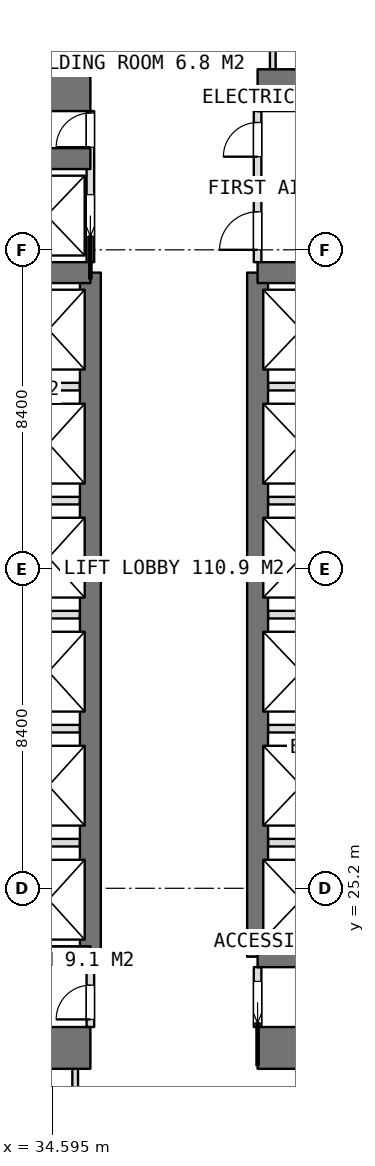
"""IFC4 building model, lengths in metres.
Left out: names, types, materials, properties, quantities, classifications, styles, units other than length and angle.
Written with IfcOpenShell. Run it as: python <this file> out.ifc"""

import sys

from ifc_helpers import new_model, si_unit, direction, frame, frame_2d, origin, place, context, subcontext, project, spatial, rectangle, extrude, element, fill, save


model = new_model("IFC4")
c1 = context("Model", 3, precision=1e-05, world=origin(), true_north=direction((0.0, 1.0)))
c2 = subcontext(c1, "Body", "Model", "MODEL_VIEW")
j1 = project(units=[si_unit("LENGTHUNIT", "METRE"), si_unit("PLANEANGLEUNIT", "RADIAN")], contexts=[c1])
p1 = place(None, origin())
s1 = spatial("IfcSite", under=j1, at=p1, CompositionType="ELEMENT")
p2 = place(p1, origin())
s2 = spatial("IfcBuilding", under=s1, at=p2, CompositionType="ELEMENT")
p3 = place(p2, frame((0.0, 0.0, 20.4)))
s3 = spatial("IfcBuildingStorey", under=s2, at=p3, CompositionType="ELEMENT", Elevation=20.4)
p4 = place(p3, frame((25.2, 21.0, 0.0), z_axis=(0.0, 0.0, 1.0), x_axis=(1.0, 0.0, 0.0)))
e1 = element("IfcWall", 1, at=p4, inside=s3, PredefinedType="SHEAR", context=c2, shape_type="SweptSolid", body=[
    extrude(rectangle(XDim=10.4, YDim=1.1, at=frame_2d((5.2, 0.0))), origin(), (0.0, 0.0, 1.0), 5.0),
])
p5 = place(p3, frame((40.0, 21.0, 0.0), z_axis=(0.0, 0.0, 1.0), x_axis=(1.0, 0.0, 0.0)))
e2 = element("IfcWall", 2, at=p5, inside=s3, PredefinedType="SHEAR", context=c2, shape_type="SweptSolid", body=[
    extrude(rectangle(XDim=10.4, YDim=1.1, at=frame_2d((5.2, 0.0))), origin(), (0.0, 0.0, 1.0), 5.0),
])
p6 = place(p3, frame((25.2, 46.2, 0.0), z_axis=(0.0, 0.0, 1.0), x_axis=(1.0, 0.0, 0.0)))
e3 = element("IfcWall", 3, at=p6, inside=s3, PredefinedType="SHEAR", context=c2, shape_type="SweptSolid", body=[
    extrude(rectangle(XDim=10.4, YDim=1.1, at=frame_2d((5.2, 0.0))), origin(), (0.0, 0.0, 1.0), 5.0),
])
p7 = place(p3, frame((40.0, 46.2, 0.0), z_axis=(0.0, 0.0, 1.0), x_axis=(1.0, 0.0, 0.0)))
e4 = element("IfcWall", 4, at=p7, inside=s3, PredefinedType="SHEAR", context=c2, shape_type="SweptSolid", body=[
    extrude(rectangle(XDim=10.4, YDim=1.1, at=frame_2d((5.2, 0.0))), origin(), (0.0, 0.0, 1.0), 5.0),
])
for number, where, z_axis, x_axis in (
    (5, (35.6, 23.4, 0.0), (0.0, 0.0, 1.0), (0.0, 1.0, 0.0)),
    (6, (40.0, 23.4, 0.0), (0.0, 0.0, 1.0), (0.0, 1.0, 0.0)),
):
    element("IfcWall", number, at=place(p3, frame(where, z_axis=z_axis, x_axis=x_axis)), inside=s3, PredefinedType="SHEAR", context=c2, shape_type="SweptSolid", body=[
        extrude(rectangle(XDim=18.0, YDim=0.55, at=frame_2d((9.0, 0.0))), origin(), (0.0, 0.0, 1.0), 5.0),
    ])
for number, where, z_axis, x_axis in (
    (7, (31.8, 23.4, 0.0), (0.0, 0.0, 1.0), (1.0, 0.0, 0.0)),
    (8, (31.8, 41.4, 0.0), (0.0, 0.0, 1.0), (1.0, 0.0, 0.0)),
    (9, (31.8, 44.4, 0.0), (0.0, 0.0, 1.0), (1.0, 0.0, 0.0)),
    (10, (40.0, 23.4, 0.0), (0.0, 0.0, 1.0), (1.0, 0.0, 0.0)),
    (11, (40.0, 41.4, 0.0), (0.0, 0.0, 1.0), (1.0, 0.0, 0.0)),
):
    element("IfcWall", number, at=place(p3, frame(where, z_axis=z_axis, x_axis=x_axis)), inside=s3, PredefinedType="SHEAR", context=c2, shape_type="SweptSolid", body=[
        extrude(rectangle(XDim=3.8, YDim=0.55, at=frame_2d((1.9, 0.0))), origin(), (0.0, 0.0, 1.0), 5.0),
    ])
for number, where, z_axis, x_axis in (
    (12, (32.075, 26.4, 0.0), (0.0, 0.0, 1.0), (1.0, 0.0, 0.0)),
    (13, (32.075, 29.4, 0.0), (0.0, 0.0, 1.0), (1.0, 0.0, 0.0)),
    (14, (32.075, 32.4, 0.0), (0.0, 0.0, 1.0), (1.0, 0.0, 0.0)),
    (15, (32.075, 35.4, 0.0), (0.0, 0.0, 1.0), (1.0, 0.0, 0.0)),
    (16, (32.075, 38.4, 0.0), (0.0, 0.0, 1.0), (1.0, 0.0, 0.0)),
    (17, (40.275, 26.4, 0.0), (0.0, 0.0, 1.0), (1.0, 0.0, 0.0)),
    (18, (40.275, 29.4, 0.0), (0.0, 0.0, 1.0), (1.0, 0.0, 0.0)),
    (19, (40.275, 32.4, 0.0), (0.0, 0.0, 1.0), (1.0, 0.0, 0.0)),
    (20, (40.275, 35.4, 0.0), (0.0, 0.0, 1.0), (1.0, 0.0, 0.0)),
    (21, (40.275, 38.4, 0.0), (0.0, 0.0, 1.0), (1.0, 0.0, 0.0)),
):
    element("IfcWall", number, at=place(p3, frame(where, z_axis=z_axis, x_axis=x_axis)), inside=s3, PredefinedType="PARTITIONING", context=c2, shape_type="SweptSolid", body=[
        extrude(rectangle(XDim=3.25, YDim=0.2, at=frame_2d((1.625, 0.0))), origin(), (0.0, 0.0, 1.0), 4.6),
    ])
p8 = place(p3, frame((40.0, 21.55, 0.0), z_axis=(0.0, 0.0, 1.0), x_axis=(0.0, 1.0, 0.0)))
e22 = element("IfcWall", 22, at=p8, inside=s3, PredefinedType="PARTITIONING", context=c2, shape_type="SweptSolid", body=[
    extrude(rectangle(XDim=1.575, YDim=0.2, at=frame_2d((0.788, 0.0))), origin(), (0.0, 0.0, 1.0), 4.6),
])
p9 = place(p8, frame((0.1, 0.0, 0.0)))
e23 = element("IfcOpeningElement", 23, at=p9, cuts=e22, PredefinedType="OPENING", context=c2, shape_type="SweptSolid", body=[
    extrude(rectangle(XDim=1.1, YDim=2.1, at=frame_2d((0.55, 1.05))), frame((0.0, 0.11, 0.0), z_axis=(0.0, -1.0, 0.0), x_axis=(1.0, 0.0, 0.0)), (0.0, 0.0, 1.0), 0.22),
])
p10 = place(p3, frame((40.0, 41.675, 0.0), z_axis=(0.0, 0.0, 1.0), x_axis=(0.0, 1.0, 0.0)))
e24 = element("IfcWall", 24, at=p10, inside=s3, PredefinedType="PARTITIONING", context=c2, shape_type="SweptSolid", body=[
    extrude(rectangle(XDim=3.975, YDim=0.2, at=frame_2d((1.987, 0.0))), origin(), (0.0, 0.0, 1.0), 4.6),
])
p11 = place(p10, frame((2.775, 0.0, 0.0)))
e25 = element("IfcOpeningElement", 25, at=p11, cuts=e24, PredefinedType="OPENING", context=c2, shape_type="SweptSolid", body=[
    extrude(rectangle(XDim=0.9, YDim=2.1, at=frame_2d((0.45, 1.05))), frame((0.0, 0.11, 0.0), z_axis=(0.0, -1.0, 0.0), x_axis=(1.0, 0.0, 0.0)), (0.0, 0.0, 1.0), 0.22),
])
p12 = place(p10, frame((0.325, 0.0, 0.0)))
e26 = element("IfcOpeningElement", 26, at=p12, cuts=e24, PredefinedType="OPENING", context=c2, shape_type="SweptSolid", body=[
    extrude(rectangle(XDim=1.0, YDim=2.1, at=frame_2d((0.5, 1.05))), frame((0.0, 0.11, 0.0), z_axis=(0.0, -1.0, 0.0), x_axis=(1.0, 0.0, 0.0)), (0.0, 0.0, 1.0), 0.22),
])
p13 = place(p3, frame((35.6, 41.675, 0.0), z_axis=(0.0, 0.0, 1.0), x_axis=(0.0, 1.0, 0.0)))
e27 = element("IfcWall", 27, at=p13, inside=s3, PredefinedType="PARTITIONING", context=c2, shape_type="SweptSolid", body=[
    extrude(rectangle(XDim=3.975, YDim=0.2, at=frame_2d((1.987, 0.0))), origin(), (0.0, 0.0, 1.0), 4.6),
])
p14 = place(p13, frame((3.025, 0.0, 0.0)))
e28 = element("IfcOpeningElement", 28, at=p14, cuts=e27, PredefinedType="OPENING", context=c2, shape_type="SweptSolid", body=[
    extrude(rectangle(XDim=0.9, YDim=2.1, at=frame_2d((0.45, 1.05))), frame((0.0, 0.11, 0.0), z_axis=(0.0, -1.0, 0.0), x_axis=(1.0, 0.0, 0.0)), (0.0, 0.0, 1.0), 0.22),
])
p15 = place(p13, frame((0.675, 0.0, 0.0)))
e29 = element("IfcOpeningElement", 29, at=p15, cuts=e27, PredefinedType="OPENING", context=c2, shape_type="SweptSolid", body=[
    extrude(rectangle(XDim=1.1, YDim=2.1, at=frame_2d((0.55, 1.05))), frame((0.0, 0.11, 0.0), z_axis=(0.0, -1.0, 0.0), x_axis=(1.0, 0.0, 0.0)), (0.0, 0.0, 1.0), 0.22),
])
p16 = place(p3, frame((35.6, 21.55, 0.0), z_axis=(0.0, 0.0, 1.0), x_axis=(0.0, 1.0, 0.0)))
e30 = element("IfcWall", 30, at=p16, inside=s3, PredefinedType="PARTITIONING", context=c2, shape_type="SweptSolid", body=[
    extrude(rectangle(XDim=1.575, YDim=0.2, at=frame_2d((0.788, 0.0))), origin(), (0.0, 0.0, 1.0), 4.6),
])
p17 = place(p16, frame((0.2, 0.0, 0.0)))
e31 = element("IfcOpeningElement", 31, at=p17, cuts=e30, PredefinedType="OPENING", context=c2, shape_type="SweptSolid", body=[
    extrude(rectangle(XDim=0.9, YDim=2.1, at=frame_2d((0.45, 1.05))), frame((0.0, 0.11, 0.0), z_axis=(0.0, -1.0, 0.0), x_axis=(1.0, 0.0, 0.0)), (0.0, 0.0, 1.0), 0.22),
])
p18 = place(p3, frame((40.0, 43.6, 0.0), z_axis=(0.0, 0.0, 1.0), x_axis=(1.0, 0.0, 0.0)))
e32 = element("IfcWall", 32, at=p18, inside=s3, PredefinedType="PARTITIONING", context=c2, shape_type="SweptSolid", body=[
    extrude(rectangle(XDim=3.525, YDim=0.2, at=frame_2d((1.762, 0.0))), origin(), (0.0, 0.0, 1.0), 4.6),
])
for number, where, z_axis, x_axis in (
    (33, (40.4, 46.75, 0.0), (0.0, 0.0, 1.0), (0.0, 1.0, 0.0)),
    (34, (35.2, 46.75, 0.0), (0.0, 0.0, 1.0), (0.0, 1.0, 0.0)),
    (35, (35.2, 18.21, 0.0), (0.0, 0.0, 1.0), (0.0, 1.0, 0.0)),
):
    element("IfcWall", number, at=place(p3, frame(where, z_axis=z_axis, x_axis=x_axis)), inside=s3, PredefinedType="PARTITIONING", context=c2, shape_type="SweptSolid", body=[
        extrude(rectangle(XDim=2.24, YDim=0.15, at=frame_2d((1.12, 0.0))), origin(), (0.0, 0.0, 1.0), 4.6),
    ])
p19 = place(p9, origin())
e36 = element("IfcDoor", 36, at=p19, inside=s3, OperationType="SLIDING_TO_LEFT", PredefinedType="DOOR", context=c2, shape_type="SweptSolid", body=[
    extrude(rectangle(XDim=1.1, YDim=2.1, at=frame_2d((0.55, 1.05))), frame((0.0, 0.025, 0.0), z_axis=(0.0, -1.0, 0.0), x_axis=(1.0, 0.0, 0.0)), (0.0, 0.0, 1.0), 0.05),
])
fill(e23, e36)
p20 = place(p17, origin())
e37 = element("IfcDoor", 37, at=p20, inside=s3, OperationType="SINGLE_SWING_LEFT", PredefinedType="DOOR", context=c2, shape_type="SweptSolid", body=[
    extrude(rectangle(XDim=0.9, YDim=2.1, at=frame_2d((0.45, 1.05))), frame((0.0, 0.025, 0.0), z_axis=(0.0, -1.0, 0.0), x_axis=(1.0, 0.0, 0.0)), (0.0, 0.0, 1.0), 0.05),
])
fill(e31, e37)
p21 = place(p11, origin())
e38 = element("IfcDoor", 38, at=p21, inside=s3, OperationType="SINGLE_SWING_LEFT", PredefinedType="DOOR", context=c2, shape_type="SweptSolid", body=[
    extrude(rectangle(XDim=0.9, YDim=2.1, at=frame_2d((0.45, 1.05))), frame((0.0, 0.025, 0.0), z_axis=(0.0, -1.0, 0.0), x_axis=(1.0, 0.0, 0.0)), (0.0, 0.0, 1.0), 0.05),
])
fill(e25, e38)
p22 = place(p12, origin())
e39 = element("IfcDoor", 39, at=p22, inside=s3, OperationType="SINGLE_SWING_LEFT", PredefinedType="DOOR", context=c2, shape_type="SweptSolid", body=[
    extrude(rectangle(XDim=1.0, YDim=2.1, at=frame_2d((0.5, 1.05))), frame((0.0, 0.025, 0.0), z_axis=(0.0, -1.0, 0.0), x_axis=(1.0, 0.0, 0.0)), (0.0, 0.0, 1.0), 0.05),
])
fill(e26, e39)
p23 = place(p14, origin())
e40 = element("IfcDoor", 40, at=p23, inside=s3, OperationType="SINGLE_SWING_LEFT", PredefinedType="DOOR", context=c2, shape_type="SweptSolid", body=[
    extrude(rectangle(XDim=0.9, YDim=2.1, at=frame_2d((0.45, 1.05))), frame((0.0, 0.025, 0.0), z_axis=(0.0, -1.0, 0.0), x_axis=(1.0, 0.0, 0.0)), (0.0, 0.0, 1.0), 0.05),
])
fill(e28, e40)
p24 = place(p15, origin())
e41 = element("IfcDoor", 41, at=p24, inside=s3, OperationType="SLIDING_TO_LEFT", PredefinedType="USERDEFINED", context=c2, shape_type="SweptSolid", body=[
    extrude(rectangle(XDim=1.1, YDim=2.1, at=frame_2d((0.55, 1.05))), frame((0.0, 0.025, 0.0), z_axis=(0.0, -1.0, 0.0), x_axis=(1.0, 0.0, 0.0)), (0.0, 0.0, 1.0), 0.05),
])
fill(e29, e41)
save(model, sys.argv[1])
